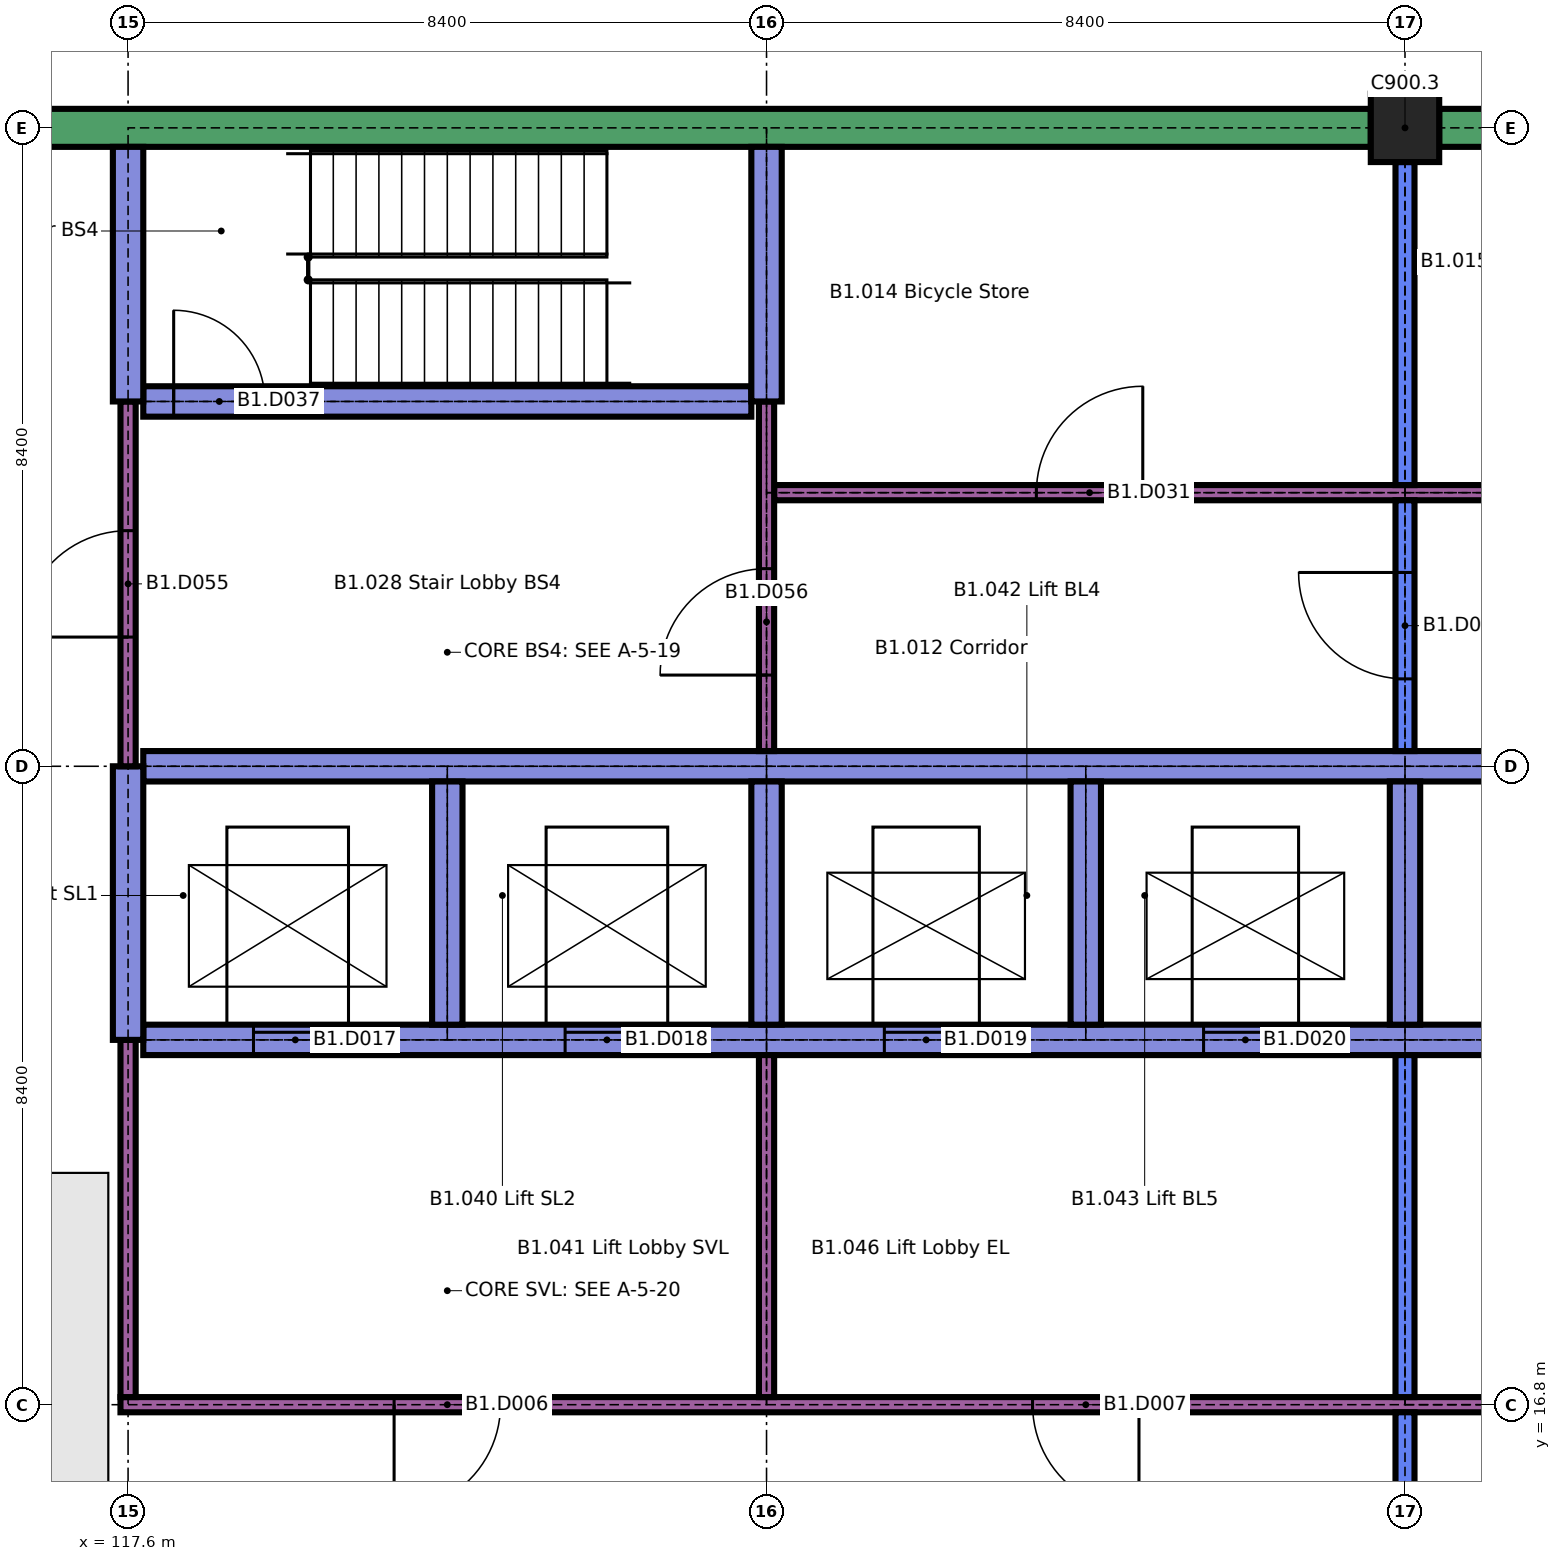
"""IFC4 building model, lengths in metres.
Left out: names, types, materials, properties, quantities, classifications, styles, units other than length and angle.
Written with IfcOpenShell. Run it as: python <this file> out.ifc"""

import sys

from ifc_helpers import new_model, si_unit, direction, frame, frame_2d, origin, origin_2d, place, context, subcontext, project, spatial, rectangle, extrude, element, fill, save


model = new_model("IFC4")
c1 = context("Model", 3, precision=1e-05, world=origin(), true_north=direction((0.0, 1.0)))
c2 = subcontext(c1, "Body", "Model", "MODEL_VIEW")
j1 = project(units=[si_unit("LENGTHUNIT", "METRE"), si_unit("PLANEANGLEUNIT", "RADIAN")], contexts=[c1])
p1 = place(None, origin())
s1 = spatial("IfcSite", under=j1, at=p1, CompositionType="ELEMENT")
p2 = place(p1, origin())
s2 = spatial("IfcBuilding", under=s1, at=p2, CompositionType="ELEMENT")
p3 = place(p2, frame((0.0, 0.0, -4.2)))
s3 = spatial("IfcBuildingStorey", under=s2, at=p3, CompositionType="ELEMENT", Elevation=-4.2)
p4 = place(p3, frame((134.4, 33.6, 0.0), z_axis=(0.0, 0.0, 1.0), x_axis=(1.0, 0.0, 0.0)))
e1 = element("IfcColumn", 1, at=p4, inside=s3, PredefinedType="COLUMN", context=c2, shape_type="SweptSolid", body=[
    extrude(rectangle(XDim=0.9, YDim=0.9, at=origin_2d()), origin(), (0.0, 0.0, 1.0), 3.75),
])
p5 = place(p3, frame((101.25, 33.6, 0.0), z_axis=(0.0, 0.0, 1.0), x_axis=(1.0, 0.0, 0.0)))
e2 = element("IfcWall", 2, at=p5, inside=s3, PredefinedType="SOLIDWALL", context=c2, shape_type="SweptSolid", body=[
    extrude(rectangle(XDim=32.7, YDim=0.5, at=frame_2d((16.35, 0.0))), origin(), (0.0, 0.0, 1.0), 3.75),
])
p6 = place(p3, frame((134.85, 33.6, 0.0), z_axis=(0.0, 0.0, 1.0), x_axis=(1.0, 0.0, 0.0)))
e3 = element("IfcWall", 3, at=p6, inside=s3, PredefinedType="SOLIDWALL", context=c2, shape_type="SweptSolid", body=[
    extrude(rectangle(XDim=15.9, YDim=0.5, at=frame_2d((7.95, 0.0))), origin(), (0.0, 0.0, 1.0), 3.75),
])
p7 = place(p3, frame((117.5, 16.8, 0.0), z_axis=(0.0, 0.0, 1.0), x_axis=(1.0, 0.0, 0.0)))
e4 = element("IfcWall", 4, at=p7, inside=s3, PredefinedType="PARTITIONING", context=c2, shape_type="SweptSolid", body=[
    extrude(rectangle(XDim=25.4, YDim=0.2, at=frame_2d((12.7, 0.0))), origin(), (0.0, 0.0, 1.0), 3.75),
])
p8 = place(p7, frame((3.6, 0.0, 0.0)))
e5 = element("IfcOpeningElement", 5, at=p8, cuts=e4, PredefinedType="OPENING", context=c2, shape_type="SweptSolid", body=[
    extrude(rectangle(XDim=1.4, YDim=2.1, at=frame_2d((0.7, 1.05))), frame((0.0, 0.11, 0.0), z_axis=(0.0, -1.0, 0.0), x_axis=(1.0, 0.0, 0.0)), (0.0, 0.0, 1.0), 0.22),
])
p9 = place(p7, frame((12.0, 0.0, 0.0)))
e6 = element("IfcOpeningElement", 6, at=p9, cuts=e4, PredefinedType="OPENING", context=c2, shape_type="SweptSolid", body=[
    extrude(rectangle(XDim=1.4, YDim=2.1, at=frame_2d((0.7, 1.05))), frame((0.0, 0.11, 0.0), z_axis=(0.0, -1.0, 0.0), x_axis=(1.0, 0.0, 0.0)), (0.0, 0.0, 1.0), 0.22),
])
p10 = place(p3, frame((117.8, 21.6, 0.0), z_axis=(0.0, 0.0, 1.0), x_axis=(1.0, 0.0, 0.0)))
e7 = element("IfcWall", 7, at=p10, inside=s3, PredefinedType="SHEAR", context=c2, shape_type="SweptSolid", body=[
    extrude(rectangle(XDim=24.8, YDim=0.4, at=frame_2d((12.4, 0.0))), origin(), (0.0, 0.0, 1.0), 3.75),
])
p11 = place(p10, frame((1.45, 0.0, 0.0)))
e8 = element("IfcOpeningElement", 8, at=p11, cuts=e7, PredefinedType="OPENING", context=c2, shape_type="SweptSolid", body=[
    extrude(rectangle(XDim=1.1, YDim=2.1, at=frame_2d((0.55, 1.05))), frame((0.0, 0.21, 0.0), z_axis=(0.0, -1.0, 0.0), x_axis=(1.0, 0.0, 0.0)), (0.0, 0.0, 1.0), 0.42),
])
p12 = place(p10, frame((5.55, 0.0, 0.0)))
e9 = element("IfcOpeningElement", 9, at=p12, cuts=e7, PredefinedType="OPENING", context=c2, shape_type="SweptSolid", body=[
    extrude(rectangle(XDim=1.1, YDim=2.1, at=frame_2d((0.55, 1.05))), frame((0.0, 0.21, 0.0), z_axis=(0.0, -1.0, 0.0), x_axis=(1.0, 0.0, 0.0)), (0.0, 0.0, 1.0), 0.42),
])
p13 = place(p10, frame((9.75, 0.0, 0.0)))
e10 = element("IfcOpeningElement", 10, at=p13, cuts=e7, PredefinedType="OPENING", context=c2, shape_type="SweptSolid", body=[
    extrude(rectangle(XDim=1.1, YDim=2.1, at=frame_2d((0.55, 1.05))), frame((0.0, 0.21, 0.0), z_axis=(0.0, -1.0, 0.0), x_axis=(1.0, 0.0, 0.0)), (0.0, 0.0, 1.0), 0.42),
])
p14 = place(p10, frame((13.95, 0.0, 0.0)))
e11 = element("IfcOpeningElement", 11, at=p14, cuts=e7, PredefinedType="OPENING", context=c2, shape_type="SweptSolid", body=[
    extrude(rectangle(XDim=1.1, YDim=2.1, at=frame_2d((0.55, 1.05))), frame((0.0, 0.21, 0.0), z_axis=(0.0, -1.0, 0.0), x_axis=(1.0, 0.0, 0.0)), (0.0, 0.0, 1.0), 0.42),
])
p15 = place(p10, frame((18.15, 0.0, 0.0)))
e12 = element("IfcOpeningElement", 12, at=p15, cuts=e7, PredefinedType="OPENING", context=c2, shape_type="SweptSolid", body=[
    extrude(rectangle(XDim=1.1, YDim=2.1, at=frame_2d((0.55, 1.05))), frame((0.0, 0.21, 0.0), z_axis=(0.0, -1.0, 0.0), x_axis=(1.0, 0.0, 0.0)), (0.0, 0.0, 1.0), 0.42),
])
p16 = place(p10, frame((22.25, 0.0, 0.0)))
e13 = element("IfcOpeningElement", 13, at=p16, cuts=e7, PredefinedType="OPENING", context=c2, shape_type="SweptSolid", body=[
    extrude(rectangle(XDim=1.1, YDim=2.1, at=frame_2d((0.55, 1.05))), frame((0.0, 0.21, 0.0), z_axis=(0.0, -1.0, 0.0), x_axis=(1.0, 0.0, 0.0)), (0.0, 0.0, 1.0), 0.42),
])
p17 = place(p3, frame((117.8, 25.2, 0.0), z_axis=(0.0, 0.0, 1.0), x_axis=(1.0, 0.0, 0.0)))
e14 = element("IfcWall", 14, at=p17, inside=s3, PredefinedType="SHEAR", context=c2, shape_type="SweptSolid", body=[
    extrude(rectangle(XDim=24.8, YDim=0.4, at=frame_2d((12.4, 0.0))), origin(), (0.0, 0.0, 1.0), 3.75),
])
p18 = place(p3, frame((126.1, 28.8, 0.0), z_axis=(0.0, 0.0, 1.0), x_axis=(1.0, 0.0, 0.0)))
e15 = element("IfcWall", 15, at=p18, inside=s3, PredefinedType="PARTITIONING", context=c2, shape_type="SweptSolid", body=[
    extrude(rectangle(XDim=12.4, YDim=0.2, at=frame_2d((6.2, 0.0))), origin(), (0.0, 0.0, 1.0), 3.75),
])
p19 = place(p18, frame((3.45, 0.0, 0.0)))
e16 = element("IfcOpeningElement", 16, at=p19, cuts=e15, PredefinedType="OPENING", context=c2, shape_type="SweptSolid", body=[
    extrude(rectangle(XDim=1.4, YDim=2.1, at=frame_2d((0.7, 1.05))), frame((0.0, 0.11, 0.0), z_axis=(0.0, -1.0, 0.0), x_axis=(1.0, 0.0, 0.0)), (0.0, 0.0, 1.0), 0.22),
])
p20 = place(p18, frame((9.65, 0.0, 0.0)))
e17 = element("IfcOpeningElement", 17, at=p20, cuts=e15, PredefinedType="OPENING", context=c2, shape_type="SweptSolid", body=[
    extrude(rectangle(XDim=1.4, YDim=2.1, at=frame_2d((0.7, 1.05))), frame((0.0, 0.11, 0.0), z_axis=(0.0, -1.0, 0.0), x_axis=(1.0, 0.0, 0.0)), (0.0, 0.0, 1.0), 0.22),
])
p21 = place(p3, frame((117.8, 30.0, 0.0), z_axis=(0.0, 0.0, 1.0), x_axis=(1.0, 0.0, 0.0)))
e18 = element("IfcWall", 18, at=p21, inside=s3, PredefinedType="SHEAR", context=c2, shape_type="SweptSolid", body=[
    extrude(rectangle(XDim=8.0, YDim=0.4, at=frame_2d((4.0, 0.0))), origin(), (0.0, 0.0, 1.0), 3.75),
])
p22 = place(p21, frame((0.4, 0.0, 0.0)))
e19 = element("IfcOpeningElement", 19, at=p22, cuts=e18, PredefinedType="OPENING", context=c2, shape_type="SweptSolid", body=[
    extrude(rectangle(XDim=1.2, YDim=2.1, at=frame_2d((0.6, 1.05))), frame((0.0, 0.21, 0.0), z_axis=(0.0, -1.0, 0.0), x_axis=(1.0, 0.0, 0.0)), (0.0, 0.0, 1.0), 0.42),
])
p23 = place(p3, frame((117.6, 16.9, 0.0), z_axis=(0.0, 0.0, 1.0), x_axis=(0.0, 1.0, 0.0)))
e20 = element("IfcWall", 20, at=p23, inside=s3, PredefinedType="PARTITIONING", context=c2, shape_type="SweptSolid", body=[
    extrude(rectangle(XDim=4.7, YDim=0.2, at=frame_2d((2.35, 0.0))), origin(), (0.0, 0.0, 1.0), 3.75),
])
p24 = place(p3, frame((117.6, 21.6, 0.0), z_axis=(0.0, 0.0, 1.0), x_axis=(0.0, 1.0, 0.0)))
e21 = element("IfcWall", 21, at=p24, inside=s3, PredefinedType="SHEAR", context=c2, shape_type="SweptSolid", body=[
    extrude(rectangle(XDim=3.6, YDim=0.4, at=frame_2d((1.8, 0.0))), origin(), (0.0, 0.0, 1.0), 3.75),
])
p25 = place(p3, frame((117.6, 25.2, 0.0), z_axis=(0.0, 0.0, 1.0), x_axis=(0.0, 1.0, 0.0)))
e22 = element("IfcWall", 22, at=p25, inside=s3, PredefinedType="PARTITIONING", context=c2, shape_type="SweptSolid", body=[
    extrude(rectangle(XDim=4.8, YDim=0.2, at=frame_2d((2.4, 0.0))), origin(), (0.0, 0.0, 1.0), 3.75),
])
p26 = place(p25, frame((1.7, 0.0, 0.0)))
e23 = element("IfcOpeningElement", 23, at=p26, cuts=e22, PredefinedType="OPENING", context=c2, shape_type="SweptSolid", body=[
    extrude(rectangle(XDim=1.4, YDim=2.1, at=frame_2d((0.7, 1.05))), frame((0.0, 0.11, 0.0), z_axis=(0.0, -1.0, 0.0), x_axis=(1.0, 0.0, 0.0)), (0.0, 0.0, 1.0), 0.22),
])
p27 = place(p3, frame((117.6, 30.0, 0.0), z_axis=(0.0, 0.0, 1.0), x_axis=(0.0, 1.0, 0.0)))
e24 = element("IfcWall", 24, at=p27, inside=s3, PredefinedType="SHEAR", context=c2, shape_type="SweptSolid", body=[
    extrude(rectangle(XDim=3.35, YDim=0.4, at=frame_2d((1.675, 0.0))), origin(), (0.0, 0.0, 1.0), 3.75),
])
p28 = place(p3, frame((121.8, 21.8, 0.0), z_axis=(0.0, 0.0, 1.0), x_axis=(0.0, 1.0, 0.0)))
e25 = element("IfcWall", 25, at=p28, inside=s3, PredefinedType="SHEAR", context=c2, shape_type="SweptSolid", body=[
    extrude(rectangle(XDim=3.2, YDim=0.4, at=frame_2d((1.6, 0.0))), origin(), (0.0, 0.0, 1.0), 3.75),
])
p29 = place(p3, frame((126.0, 16.9, 0.0), z_axis=(0.0, 0.0, 1.0), x_axis=(0.0, 1.0, 0.0)))
e26 = element("IfcWall", 26, at=p29, inside=s3, PredefinedType="PARTITIONING", context=c2, shape_type="SweptSolid", body=[
    extrude(rectangle(XDim=4.5, YDim=0.2, at=frame_2d((2.25, 0.0))), origin(), (0.0, 0.0, 1.0), 3.75),
])
p30 = place(p3, frame((126.0, 21.8, 0.0), z_axis=(0.0, 0.0, 1.0), x_axis=(0.0, 1.0, 0.0)))
e27 = element("IfcWall", 27, at=p30, inside=s3, PredefinedType="SHEAR", context=c2, shape_type="SweptSolid", body=[
    extrude(rectangle(XDim=3.2, YDim=0.4, at=frame_2d((1.6, 0.0))), origin(), (0.0, 0.0, 1.0), 3.75),
])
p31 = place(p3, frame((126.0, 25.4, 0.0), z_axis=(0.0, 0.0, 1.0), x_axis=(0.0, 1.0, 0.0)))
e28 = element("IfcWall", 28, at=p31, inside=s3, PredefinedType="PARTITIONING", context=c2, shape_type="SweptSolid", body=[
    extrude(rectangle(XDim=4.6, YDim=0.2, at=frame_2d((2.3, 0.0))), origin(), (0.0, 0.0, 1.0), 3.75),
])
p32 = place(p31, frame((1.0, 0.0, 0.0)))
e29 = element("IfcOpeningElement", 29, at=p32, cuts=e28, PredefinedType="OPENING", context=c2, shape_type="SweptSolid", body=[
    extrude(rectangle(XDim=1.4, YDim=2.1, at=frame_2d((0.7, 1.05))), frame((0.0, 0.11, 0.0), z_axis=(0.0, -1.0, 0.0), x_axis=(1.0, 0.0, 0.0)), (0.0, 0.0, 1.0), 0.22),
])
p33 = place(p3, frame((126.0, 30.0, 0.0), z_axis=(0.0, 0.0, 1.0), x_axis=(0.0, 1.0, 0.0)))
e30 = element("IfcWall", 30, at=p33, inside=s3, PredefinedType="SHEAR", context=c2, shape_type="SweptSolid", body=[
    extrude(rectangle(XDim=3.35, YDim=0.4, at=frame_2d((1.675, 0.0))), origin(), (0.0, 0.0, 1.0), 3.75),
])
p34 = place(p3, frame((130.2, 21.8, 0.0), z_axis=(0.0, 0.0, 1.0), x_axis=(0.0, 1.0, 0.0)))
e31 = element("IfcWall", 31, at=p34, inside=s3, PredefinedType="SHEAR", context=c2, shape_type="SweptSolid", body=[
    extrude(rectangle(XDim=3.2, YDim=0.4, at=frame_2d((1.6, 0.0))), origin(), (0.0, 0.0, 1.0), 3.75),
])
p35 = place(p3, frame((134.4, 8.85, 0.0), z_axis=(0.0, 0.0, 1.0), x_axis=(0.0, 1.0, 0.0)))
e32 = element("IfcWall", 32, at=p35, inside=s3, PredefinedType="SOLIDWALL", context=c2, shape_type="SweptSolid", body=[
    extrude(rectangle(XDim=7.85, YDim=0.25, at=frame_2d((3.925, 0.0))), origin(), (0.0, 0.0, 1.0), 3.75),
])
p36 = place(p35, frame((0.3, 0.0, 0.0)))
e33 = element("IfcOpeningElement", 33, at=p36, cuts=e32, PredefinedType="OPENING", context=c2, shape_type="SweptSolid", body=[
    extrude(rectangle(XDim=6.0, YDim=2.5, at=frame_2d((3.0, 1.25))), frame((0.0, 0.135, 0.0), z_axis=(0.0, -1.0, 0.0), x_axis=(1.0, 0.0, 0.0)), (0.0, 0.0, 1.0), 0.27),
])
p37 = place(p3, frame((134.4, 16.9, 0.0), z_axis=(0.0, 0.0, 1.0), x_axis=(0.0, 1.0, 0.0)))
e34 = element("IfcWall", 34, at=p37, inside=s3, PredefinedType="SOLIDWALL", context=c2, shape_type="SweptSolid", body=[
    extrude(rectangle(XDim=4.5, YDim=0.25, at=frame_2d((2.25, 0.0))), origin(), (0.0, 0.0, 1.0), 3.75),
])
p38 = place(p3, frame((134.4, 21.8, 0.0), z_axis=(0.0, 0.0, 1.0), x_axis=(0.0, 1.0, 0.0)))
e35 = element("IfcWall", 35, at=p38, inside=s3, PredefinedType="SHEAR", context=c2, shape_type="SweptSolid", body=[
    extrude(rectangle(XDim=3.2, YDim=0.4, at=frame_2d((1.6, 0.0))), origin(), (0.0, 0.0, 1.0), 3.75),
])
p39 = place(p3, frame((134.4, 25.4, 0.0), z_axis=(0.0, 0.0, 1.0), x_axis=(0.0, 1.0, 0.0)))
e36 = element("IfcWall", 36, at=p39, inside=s3, PredefinedType="SOLIDWALL", context=c2, shape_type="SweptSolid", body=[
    extrude(rectangle(XDim=3.3, YDim=0.25, at=frame_2d((1.65, 0.0))), origin(), (0.0, 0.0, 1.0), 3.75),
])
p40 = place(p39, frame((0.95, 0.0, 0.0)))
e37 = element("IfcOpeningElement", 37, at=p40, cuts=e36, PredefinedType="OPENING", context=c2, shape_type="SweptSolid", body=[
    extrude(rectangle(XDim=1.4, YDim=2.1, at=frame_2d((0.7, 1.05))), frame((0.0, 0.135, 0.0), z_axis=(0.0, -1.0, 0.0), x_axis=(1.0, 0.0, 0.0)), (0.0, 0.0, 1.0), 0.27),
])
p41 = place(p3, frame((134.4, 28.9, 0.0), z_axis=(0.0, 0.0, 1.0), x_axis=(0.0, 1.0, 0.0)))
e38 = element("IfcWall", 38, at=p41, inside=s3, PredefinedType="SOLIDWALL", context=c2, shape_type="SweptSolid", body=[
    extrude(rectangle(XDim=4.25, YDim=0.25, at=frame_2d((2.125, 0.0))), origin(), (0.0, 0.0, 1.0), 3.75),
])
p42 = place(p8, origin())
e39 = element("IfcDoor", 39, at=p42, inside=s3, OperationType="SINGLE_SWING_LEFT", PredefinedType="DOOR", context=c2, shape_type="SweptSolid", body=[
    extrude(rectangle(XDim=1.4, YDim=2.1, at=frame_2d((0.7, 1.05))), frame((0.0, 0.025, 0.0), z_axis=(0.0, -1.0, 0.0), x_axis=(1.0, 0.0, 0.0)), (0.0, 0.0, 1.0), 0.05),
])
fill(e5, e39)
p43 = place(p9, origin())
e40 = element("IfcDoor", 40, at=p43, inside=s3, OperationType="SINGLE_SWING_RIGHT", PredefinedType="DOOR", context=c2, shape_type="SweptSolid", body=[
    extrude(rectangle(XDim=1.4, YDim=2.1, at=frame_2d((0.7, 1.05))), frame((0.0, 0.025, 0.0), z_axis=(0.0, -1.0, 0.0), x_axis=(1.0, 0.0, 0.0)), (0.0, 0.0, 1.0), 0.05),
])
fill(e6, e40)
p44 = place(p11, origin())
e41 = element("IfcDoor", 41, at=p44, inside=s3, OperationType="SLIDING_TO_LEFT", PredefinedType="DOOR", context=c2, shape_type="SweptSolid", body=[
    extrude(rectangle(XDim=1.1, YDim=2.1, at=frame_2d((0.55, 1.05))), frame((0.0, 0.025, 0.0), z_axis=(0.0, -1.0, 0.0), x_axis=(1.0, 0.0, 0.0)), (0.0, 0.0, 1.0), 0.05),
])
fill(e8, e41)
p45 = place(p12, origin())
e42 = element("IfcDoor", 42, at=p45, inside=s3, OperationType="SLIDING_TO_LEFT", PredefinedType="DOOR", context=c2, shape_type="SweptSolid", body=[
    extrude(rectangle(XDim=1.1, YDim=2.1, at=frame_2d((0.55, 1.05))), frame((0.0, 0.025, 0.0), z_axis=(0.0, -1.0, 0.0), x_axis=(1.0, 0.0, 0.0)), (0.0, 0.0, 1.0), 0.05),
])
fill(e9, e42)
p46 = place(p13, origin())
e43 = element("IfcDoor", 43, at=p46, inside=s3, OperationType="SLIDING_TO_LEFT", PredefinedType="DOOR", context=c2, shape_type="SweptSolid", body=[
    extrude(rectangle(XDim=1.1, YDim=2.1, at=frame_2d((0.55, 1.05))), frame((0.0, 0.025, 0.0), z_axis=(0.0, -1.0, 0.0), x_axis=(1.0, 0.0, 0.0)), (0.0, 0.0, 1.0), 0.05),
])
fill(e10, e43)
p47 = place(p14, origin())
e44 = element("IfcDoor", 44, at=p47, inside=s3, OperationType="SLIDING_TO_LEFT", PredefinedType="DOOR", context=c2, shape_type="SweptSolid", body=[
    extrude(rectangle(XDim=1.1, YDim=2.1, at=frame_2d((0.55, 1.05))), frame((0.0, 0.025, 0.0), z_axis=(0.0, -1.0, 0.0), x_axis=(1.0, 0.0, 0.0)), (0.0, 0.0, 1.0), 0.05),
])
fill(e11, e44)
p48 = place(p19, origin())
e45 = element("IfcDoor", 45, at=p48, inside=s3, OperationType="SINGLE_SWING_LEFT", PredefinedType="DOOR", context=c2, shape_type="SweptSolid", body=[
    extrude(rectangle(XDim=1.4, YDim=2.1, at=frame_2d((0.7, 1.05))), frame((0.0, 0.025, 0.0), z_axis=(0.0, -1.0, 0.0), x_axis=(1.0, 0.0, 0.0)), (0.0, 0.0, 1.0), 0.05),
])
fill(e16, e45)
p49 = place(p22, origin())
e46 = element("IfcDoor", 46, at=p49, inside=s3, OperationType="SINGLE_SWING_RIGHT", PredefinedType="DOOR", context=c2, shape_type="SweptSolid", body=[
    extrude(rectangle(XDim=1.2, YDim=2.1, at=frame_2d((0.6, 1.05))), frame((0.0, 0.025, 0.0), z_axis=(0.0, -1.0, 0.0), x_axis=(1.0, 0.0, 0.0)), (0.0, 0.0, 1.0), 0.05),
])
fill(e19, e46)
p50 = place(p26, origin())
e47 = element("IfcDoor", 47, at=p50, inside=s3, OperationType="SINGLE_SWING_RIGHT", PredefinedType="DOOR", context=c2, shape_type="SweptSolid", body=[
    extrude(rectangle(XDim=1.4, YDim=2.1, at=frame_2d((0.7, 1.05))), frame((0.0, 0.025, 0.0), z_axis=(0.0, -1.0, 0.0), x_axis=(1.0, 0.0, 0.0)), (0.0, 0.0, 1.0), 0.05),
])
fill(e23, e47)
p51 = place(p32, origin())
e48 = element("IfcDoor", 48, at=p51, inside=s3, OperationType="SINGLE_SWING_RIGHT", PredefinedType="DOOR", context=c2, shape_type="SweptSolid", body=[
    extrude(rectangle(XDim=1.4, YDim=2.1, at=frame_2d((0.7, 1.05))), frame((0.0, 0.03, 0.0), z_axis=(0.0, -1.0, 0.0), x_axis=(1.0, 0.0, 0.0)), (0.0, 0.0, 1.0), 0.06),
])
fill(e29, e48)
p52 = place(p40, origin())
e49 = element("IfcDoor", 49, at=p52, inside=s3, OperationType="SINGLE_SWING_LEFT", PredefinedType="DOOR", context=c2, shape_type="SweptSolid", body=[
    extrude(rectangle(XDim=1.4, YDim=2.1, at=frame_2d((0.7, 1.05))), frame((0.0, 0.03, 0.0), z_axis=(0.0, -1.0, 0.0), x_axis=(1.0, 0.0, 0.0)), (0.0, 0.0, 1.0), 0.06),
])
fill(e37, e49)
save(model, sys.argv[1])
